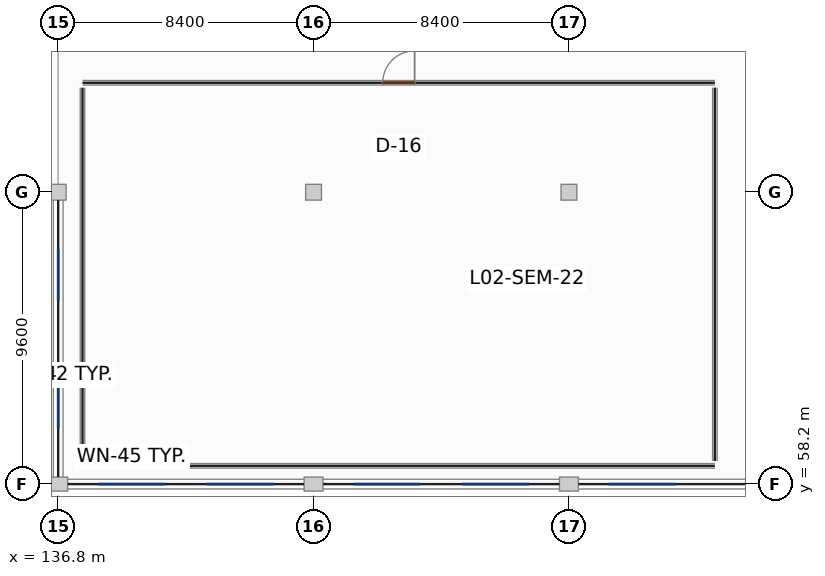
"""IFC4 building model, lengths in metres.
Left out: names, types, materials, properties, quantities, classifications, styles, units other than length and angle.
Written with IfcOpenShell. Run it as: python <this file> out.ifc"""

import sys

from ifc_helpers import new_model, si_unit, direction, frame, frame_2d, origin, origin_2d, place, context, subcontext, project, spatial, rectangle, extrude, element, fill, save


model = new_model("IFC4")
c1 = context("Model", 3, precision=1e-05, world=origin(), true_north=direction((0.0, 1.0)))
c2 = subcontext(c1, "Body", "Model", "MODEL_VIEW")
j1 = project(units=[si_unit("LENGTHUNIT", "METRE"), si_unit("PLANEANGLEUNIT", "RADIAN")], contexts=[c1])
p1 = place(None, origin())
s1 = spatial("IfcSite", under=j1, at=p1, CompositionType="ELEMENT")
p2 = place(p1, origin())
s2 = spatial("IfcBuilding", under=s1, at=p2, CompositionType="ELEMENT")
p3 = place(p2, frame((0.0, 0.0, 9.9)))
s3 = spatial("IfcBuildingStorey", under=s2, at=p3, CompositionType="ELEMENT", Elevation=9.9)
p4 = place(p3, frame((136.8, 58.2, 0.0), z_axis=(0.0, 0.0, 1.0), x_axis=(1.0, 0.0, 0.0)))
e1 = element("IfcColumn", 1, at=p4, inside=s3, PredefinedType="COLUMN", context=c2, shape_type="SweptSolid", body=[
    extrude(rectangle(XDim=0.62, YDim=0.46, at=origin_2d()), origin(), (0.0, 0.0, 1.0), 3.98),
])
p5 = place(p3, frame((136.8, 67.8, 0.0), z_axis=(0.0, 0.0, 1.0), x_axis=(1.0, 0.0, 0.0)))
e2 = element("IfcColumn", 2, at=p5, inside=s3, PredefinedType="COLUMN", context=c2, shape_type="SweptSolid", body=[
    extrude(rectangle(XDim=0.52, YDim=0.52, at=origin_2d()), origin(), (0.0, 0.0, 1.0), 3.96),
])
p6 = place(p3, frame((145.2, 58.2, 0.0), z_axis=(0.0, 0.0, 1.0), x_axis=(1.0, 0.0, 0.0)))
e3 = element("IfcColumn", 3, at=p6, inside=s3, PredefinedType="COLUMN", context=c2, shape_type="SweptSolid", body=[
    extrude(rectangle(XDim=0.62, YDim=0.46, at=origin_2d()), origin(), (0.0, 0.0, 1.0), 3.98),
])
p7 = place(p3, frame((145.2, 67.8, 0.0), z_axis=(0.0, 0.0, 1.0), x_axis=(1.0, 0.0, 0.0)))
e4 = element("IfcColumn", 4, at=p7, inside=s3, PredefinedType="COLUMN", context=c2, shape_type="SweptSolid", body=[
    extrude(rectangle(XDim=0.52, YDim=0.52, at=origin_2d()), origin(), (0.0, 0.0, 1.0), 3.98),
])
p8 = place(p3, frame((153.6, 58.2, 0.0), z_axis=(0.0, 0.0, 1.0), x_axis=(1.0, 0.0, 0.0)))
e5 = element("IfcColumn", 5, at=p8, inside=s3, PredefinedType="COLUMN", context=c2, shape_type="SweptSolid", body=[
    extrude(rectangle(XDim=0.62, YDim=0.46, at=origin_2d()), origin(), (0.0, 0.0, 1.0), 3.98),
])
p9 = place(p3, frame((153.6, 67.8, 0.0), z_axis=(0.0, 0.0, 1.0), x_axis=(1.0, 0.0, 0.0)))
e6 = element("IfcColumn", 6, at=p9, inside=s3, PredefinedType="COLUMN", context=c2, shape_type="SweptSolid", body=[
    extrude(rectangle(XDim=0.52, YDim=0.52, at=origin_2d()), origin(), (0.0, 0.0, 1.0), 3.98),
])
p10 = place(p3, frame((137.112, 58.2, 0.0), z_axis=(0.0, 0.0, 1.0), x_axis=(1.0, 0.0, 0.0)))
e7 = element("IfcWall", 7, at=p10, inside=s3, PredefinedType="SOLIDWALL", context=c2, shape_type="SweptSolid", body=[
    extrude(rectangle(XDim=7.776, YDim=0.32, at=frame_2d((3.888, 0.0))), origin(), (0.0, 0.0, 1.0), 3.08),
])
p11 = place(p10, frame((1.0, 0.0, 0.8)))
e8 = element("IfcOpeningElement", 8, at=p11, cuts=e7, PredefinedType="OPENING", context=c2, shape_type="SweptSolid", body=[
    extrude(rectangle(XDim=2.2, YDim=2.0, at=frame_2d((1.1, 1.0))), frame((0.0, 0.17, 0.0), z_axis=(0.0, -1.0, 0.0), x_axis=(1.0, 0.0, 0.0)), (0.0, 0.0, 1.0), 0.34),
])
p12 = place(p10, frame((4.576, 0.0, 0.8)))
e9 = element("IfcOpeningElement", 9, at=p12, cuts=e7, PredefinedType="OPENING", context=c2, shape_type="SweptSolid", body=[
    extrude(rectangle(XDim=2.2, YDim=2.0, at=frame_2d((1.1, 1.0))), frame((0.0, 0.17, 0.0), z_axis=(0.0, -1.0, 0.0), x_axis=(1.0, 0.0, 0.0)), (0.0, 0.0, 1.0), 0.34),
])
p13 = place(p3, frame((145.512, 58.2, 0.0), z_axis=(0.0, 0.0, 1.0), x_axis=(1.0, 0.0, 0.0)))
e10 = element("IfcWall", 10, at=p13, inside=s3, PredefinedType="SOLIDWALL", context=c2, shape_type="SweptSolid", body=[
    extrude(rectangle(XDim=7.776, YDim=0.32, at=frame_2d((3.888, 0.0))), origin(), (0.0, 0.0, 1.0), 3.08),
])
p14 = place(p13, frame((1.0, 0.0, 0.8)))
e11 = element("IfcOpeningElement", 11, at=p14, cuts=e10, PredefinedType="OPENING", context=c2, shape_type="SweptSolid", body=[
    extrude(rectangle(XDim=2.2, YDim=2.0, at=frame_2d((1.1, 1.0))), frame((0.0, 0.17, 0.0), z_axis=(0.0, -1.0, 0.0), x_axis=(1.0, 0.0, 0.0)), (0.0, 0.0, 1.0), 0.34),
])
p15 = place(p13, frame((4.576, 0.0, 0.8)))
e12 = element("IfcOpeningElement", 12, at=p15, cuts=e10, PredefinedType="OPENING", context=c2, shape_type="SweptSolid", body=[
    extrude(rectangle(XDim=2.2, YDim=2.0, at=frame_2d((1.1, 1.0))), frame((0.0, 0.17, 0.0), z_axis=(0.0, -1.0, 0.0), x_axis=(1.0, 0.0, 0.0)), (0.0, 0.0, 1.0), 0.34),
])
p16 = place(p3, frame((153.912, 58.2, 0.0), z_axis=(0.0, 0.0, 1.0), x_axis=(1.0, 0.0, 0.0)))
e13 = element("IfcWall", 13, at=p16, inside=s3, PredefinedType="SOLIDWALL", context=c2, shape_type="SweptSolid", body=[
    extrude(rectangle(XDim=7.776, YDim=0.32, at=frame_2d((3.888, 0.0))), origin(), (0.0, 0.0, 1.0), 3.08),
])
p17 = place(p16, frame((1.0, 0.0, 0.8)))
e14 = element("IfcOpeningElement", 14, at=p17, cuts=e13, PredefinedType="OPENING", context=c2, shape_type="SweptSolid", body=[
    extrude(rectangle(XDim=2.2, YDim=2.0, at=frame_2d((1.1, 1.0))), frame((0.0, 0.17, 0.0), z_axis=(0.0, -1.0, 0.0), x_axis=(1.0, 0.0, 0.0)), (0.0, 0.0, 1.0), 0.34),
])
p18 = place(p3, frame((136.8, 58.432, 0.0), z_axis=(0.0, 0.0, 1.0), x_axis=(0.0, 1.0, 0.0)))
e15 = element("IfcWall", 15, at=p18, inside=s3, PredefinedType="SOLIDWALL", context=c2, shape_type="SweptSolid", body=[
    extrude(rectangle(XDim=9.106, YDim=0.32, at=frame_2d((4.553, 0.0))), origin(), (0.0, 0.0, 1.0), 3.08),
])
p19 = place(p18, frame((1.609, 0.0, 0.85)))
e16 = element("IfcOpeningElement", 16, at=p19, cuts=e15, PredefinedType="OPENING", context=c2, shape_type="SweptSolid", body=[
    extrude(rectangle(XDim=1.7, YDim=1.95, at=frame_2d((0.85, 0.975))), frame((0.0, 0.17, 0.0), z_axis=(0.0, -1.0, 0.0), x_axis=(1.0, 0.0, 0.0)), (0.0, 0.0, 1.0), 0.34),
])
p20 = place(p18, frame((5.797, 0.0, 0.85)))
e17 = element("IfcOpeningElement", 17, at=p20, cuts=e15, PredefinedType="OPENING", context=c2, shape_type="SweptSolid", body=[
    extrude(rectangle(XDim=1.7, YDim=1.95, at=frame_2d((0.85, 0.975))), frame((0.0, 0.17, 0.0), z_axis=(0.0, -1.0, 0.0), x_axis=(1.0, 0.0, 0.0)), (0.0, 0.0, 1.0), 0.34),
])
p21 = place(p3, frame((137.6, 58.8, 0.0), z_axis=(0.0, 0.0, 1.0), x_axis=(1.0, 0.0, 0.0)))
e18 = element("IfcWall", 18, at=p21, inside=s3, PredefinedType="PARTITIONING", context=c2, shape_type="SweptSolid", body=[
    extrude(rectangle(XDim=20.8, YDim=0.15, at=frame_2d((10.4, 0.0))), origin(), (0.0, 0.0, 1.0), 2.92),
])
p22 = place(p3, frame((137.6, 71.4, 0.0), z_axis=(0.0, 0.0, 1.0), x_axis=(1.0, 0.0, 0.0)))
e19 = element("IfcWall", 19, at=p22, inside=s3, PredefinedType="PARTITIONING", context=c2, shape_type="SweptSolid", body=[
    extrude(rectangle(XDim=20.8, YDim=0.15, at=frame_2d((10.4, 0.0))), origin(), (0.0, 0.0, 1.0), 2.92),
])
p23 = place(p22, frame((9.875, 0.0, 0.0)))
e20 = element("IfcOpeningElement", 20, at=p23, cuts=e19, PredefinedType="OPENING", context=c2, shape_type="SweptSolid", body=[
    extrude(rectangle(XDim=1.05, YDim=2.2, at=frame_2d((0.525, 1.1))), frame((0.0, 0.085, 0.0), z_axis=(0.0, -1.0, 0.0), x_axis=(1.0, 0.0, 0.0)), (0.0, 0.0, 1.0), 0.17),
])
for number, where, z_axis, x_axis in (
    (21, (137.6, 58.96, 0.0), (0.0, 0.0, 1.0), (0.0, 1.0, 0.0)),
    (22, (158.4, 58.96, 0.0), (0.0, 0.0, 1.0), (0.0, 1.0, 0.0)),
):
    element("IfcWall", number, at=place(p3, frame(where, z_axis=z_axis, x_axis=x_axis)), inside=s3, PredefinedType="PARTITIONING", context=c2, shape_type="SweptSolid", body=[
        extrude(rectangle(XDim=12.28, YDim=0.15, at=frame_2d((6.14, 0.0))), origin(), (0.0, 0.0, 1.0), 2.92),
    ])
p24 = place(p11, origin())
e23 = element("IfcWindow", 23, at=p24, inside=s3, PartitioningType="SINGLE_PANEL", PredefinedType="WINDOW", context=c2, shape_type="SweptSolid", body=[
    extrude(rectangle(XDim=2.2, YDim=2.0, at=frame_2d((1.1, 1.0))), frame((0.0, 0.03, 0.0), z_axis=(0.0, -1.0, 0.0), x_axis=(1.0, 0.0, 0.0)), (0.0, 0.0, 1.0), 0.06),
])
fill(e8, e23)
p25 = place(p12, origin())
e24 = element("IfcWindow", 24, at=p25, inside=s3, PartitioningType="SINGLE_PANEL", PredefinedType="WINDOW", context=c2, shape_type="SweptSolid", body=[
    extrude(rectangle(XDim=2.2, YDim=2.0, at=frame_2d((1.1, 1.0))), frame((0.0, 0.03, 0.0), z_axis=(0.0, -1.0, 0.0), x_axis=(1.0, 0.0, 0.0)), (0.0, 0.0, 1.0), 0.06),
])
fill(e9, e24)
p26 = place(p14, origin())
e25 = element("IfcWindow", 25, at=p26, inside=s3, PartitioningType="SINGLE_PANEL", PredefinedType="WINDOW", context=c2, shape_type="SweptSolid", body=[
    extrude(rectangle(XDim=2.2, YDim=2.0, at=frame_2d((1.1, 1.0))), frame((0.0, 0.03, 0.0), z_axis=(0.0, -1.0, 0.0), x_axis=(1.0, 0.0, 0.0)), (0.0, 0.0, 1.0), 0.06),
])
fill(e11, e25)
p27 = place(p15, origin())
e26 = element("IfcWindow", 26, at=p27, inside=s3, PartitioningType="SINGLE_PANEL", PredefinedType="WINDOW", context=c2, shape_type="SweptSolid", body=[
    extrude(rectangle(XDim=2.2, YDim=2.0, at=frame_2d((1.1, 1.0))), frame((0.0, 0.03, 0.0), z_axis=(0.0, -1.0, 0.0), x_axis=(1.0, 0.0, 0.0)), (0.0, 0.0, 1.0), 0.06),
])
fill(e12, e26)
p28 = place(p17, origin())
e27 = element("IfcWindow", 27, at=p28, inside=s3, PartitioningType="SINGLE_PANEL", PredefinedType="WINDOW", context=c2, shape_type="SweptSolid", body=[
    extrude(rectangle(XDim=2.2, YDim=2.0, at=frame_2d((1.1, 1.0))), frame((0.0, 0.03, 0.0), z_axis=(0.0, -1.0, 0.0), x_axis=(1.0, 0.0, 0.0)), (0.0, 0.0, 1.0), 0.06),
])
fill(e14, e27)
p29 = place(p19, origin())
e28 = element("IfcWindow", 28, at=p29, inside=s3, PartitioningType="SINGLE_PANEL", PredefinedType="WINDOW", context=c2, shape_type="SweptSolid", body=[
    extrude(rectangle(XDim=1.7, YDim=1.95, at=frame_2d((0.85, 0.975))), frame((0.0, 0.03, 0.0), z_axis=(0.0, -1.0, 0.0), x_axis=(1.0, 0.0, 0.0)), (0.0, 0.0, 1.0), 0.06),
])
fill(e16, e28)
p30 = place(p20, origin())
e29 = element("IfcWindow", 29, at=p30, inside=s3, PartitioningType="SINGLE_PANEL", PredefinedType="WINDOW", context=c2, shape_type="SweptSolid", body=[
    extrude(rectangle(XDim=1.7, YDim=1.95, at=frame_2d((0.85, 0.975))), frame((0.0, 0.03, 0.0), z_axis=(0.0, -1.0, 0.0), x_axis=(1.0, 0.0, 0.0)), (0.0, 0.0, 1.0), 0.06),
])
fill(e17, e29)
p31 = place(p23, origin())
e30 = element("IfcDoor", 30, at=p31, inside=s3, OperationType="SINGLE_SWING_RIGHT", PredefinedType="DOOR", context=c2, shape_type="SweptSolid", body=[
    extrude(rectangle(XDim=1.05, YDim=2.2, at=frame_2d((0.525, 1.1))), frame((0.0, 0.025, 0.0), z_axis=(0.0, -1.0, 0.0), x_axis=(1.0, 0.0, 0.0)), (0.0, 0.0, 1.0), 0.05),
])
fill(e20, e30)
save(model, sys.argv[1])
